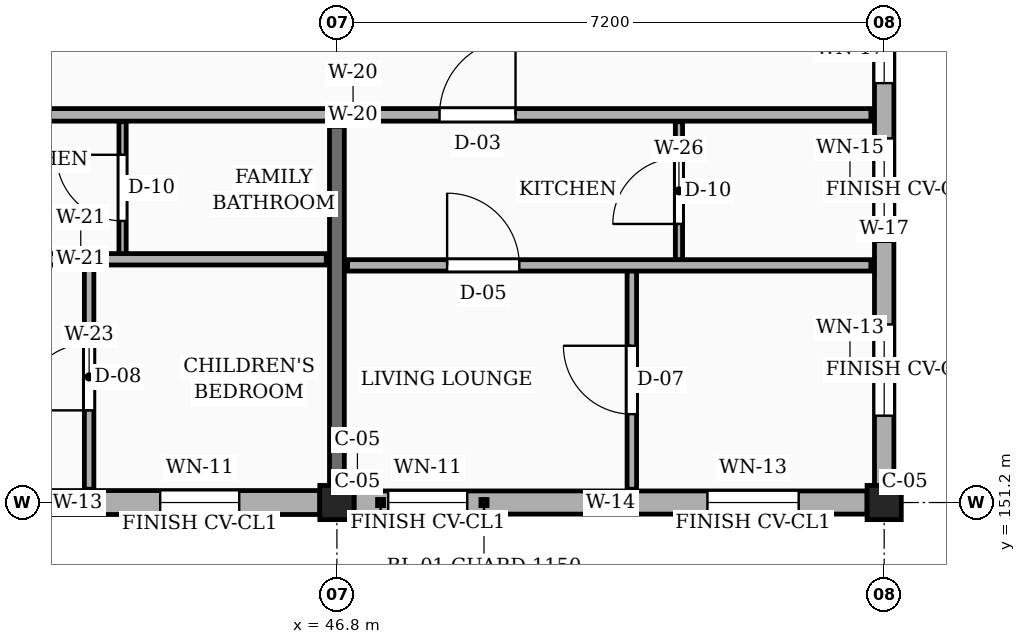
"""IFC4 building model, lengths in metres.
Left out: names, types, materials, properties, quantities, classifications, styles, units other than length and angle.
Written with IfcOpenShell. Run it as: python <this file> out.ifc"""

import sys

from ifc_helpers import new_model, si_unit, direction, frame, frame_2d, origin, origin_2d, place, context, subcontext, project, spatial, rectangle, extrude, element, fill, save


model = new_model("IFC4")
c1 = context("Model", 3, precision=1e-05, world=origin(), true_north=direction((0.0, 1.0)))
c2 = subcontext(c1, "Body", "Model", "MODEL_VIEW")
j1 = project(units=[si_unit("LENGTHUNIT", "METRE"), si_unit("PLANEANGLEUNIT", "RADIAN")], contexts=[c1])
p1 = place(None, origin())
s1 = spatial("IfcSite", under=j1, at=p1, CompositionType="ELEMENT")
p2 = place(p1, origin())
s2 = spatial("IfcBuilding", under=s1, at=p2, CompositionType="ELEMENT")
p3 = place(p2, frame((0.0, 0.0, 39.15)))
s3 = spatial("IfcBuildingStorey", under=s2, at=p3, CompositionType="ELEMENT", Elevation=39.15)
for number, where, z_axis, x_axis in (
    (1, (46.8, 151.2, 0.0), (0.0, 0.0, 1.0), (1.0, 0.0, 0.0)),
    (2, (54.0, 151.2, 0.0), (0.0, 0.0, 1.0), (1.0, 0.0, 0.0)),
):
    element("IfcColumn", number, at=place(p3, frame(where, z_axis=z_axis, x_axis=x_axis)), inside=s3, PredefinedType="COLUMN", context=c2, shape_type="SweptSolid", body=[
        extrude(rectangle(XDim=0.45, YDim=0.45, at=origin_2d()), origin(), (0.0, 0.0, 1.0), 3.15),
    ])
p4 = place(p3, frame((46.8, 151.425, 0.0), z_axis=(0.0, 0.0, 1.0), x_axis=(0.0, 1.0, 0.0)))
e3 = element("IfcWall", 3, at=p4, inside=s3, PredefinedType="SOLIDWALL", context=c2, shape_type="SweptSolid", body=[
    extrude(rectangle(XDim=4.725, YDim=0.195, at=frame_2d((2.362, 0.0))), origin(), (0.0, 0.0, 1.0), 2.185),
])
p5 = place(p3, frame((39.825, 151.2, 0.0), z_axis=(0.0, 0.0, 1.0), x_axis=(1.0, 0.0, 0.0)))
e4 = element("IfcWall", 4, at=p5, inside=s3, PredefinedType="SOLIDWALL", context=c2, shape_type="SweptSolid", body=[
    extrude(rectangle(XDim=6.75, YDim=0.315, at=frame_2d((3.375, 0.0))), origin(), (0.0, 0.0, 1.0), 2.455),
])
p6 = place(p5, frame((0.45, 0.0, 0.78)))
e5 = element("IfcOpeningElement", 5, at=p6, cuts=e4, PredefinedType="OPENING", context=c2, shape_type="SweptSolid", body=[
    extrude(rectangle(XDim=0.88, YDim=1.26, at=frame_2d((0.44, 0.63))), frame((0.0, 0.167, 0.0), z_axis=(0.0, -1.0, 0.0), x_axis=(1.0, 0.0, 0.0)), (0.0, 0.0, 1.0), 0.335),
])
p7 = place(p5, frame((4.65, 0.0, 0.78)))
e6 = element("IfcOpeningElement", 6, at=p7, cuts=e4, PredefinedType="OPENING", context=c2, shape_type="SweptSolid", body=[
    extrude(rectangle(XDim=1.04, YDim=1.26, at=frame_2d((0.52, 0.63))), frame((0.0, 0.167, 0.0), z_axis=(0.0, -1.0, 0.0), x_axis=(1.0, 0.0, 0.0)), (0.0, 0.0, 1.0), 0.335),
])
p8 = place(p3, frame((47.025, 151.2, 0.0), z_axis=(0.0, 0.0, 1.0), x_axis=(1.0, 0.0, 0.0)))
e7 = element("IfcWall", 7, at=p8, inside=s3, PredefinedType="SOLIDWALL", context=c2, shape_type="SweptSolid", body=[
    extrude(rectangle(XDim=6.75, YDim=0.305, at=frame_2d((3.375, 0.0))), origin(), (0.0, 0.0, 1.0), 2.455),
])
p9 = place(p8, frame((0.45, 0.0, 0.78)))
e8 = element("IfcOpeningElement", 8, at=p9, cuts=e7, PredefinedType="OPENING", context=c2, shape_type="SweptSolid", body=[
    extrude(rectangle(XDim=1.04, YDim=1.26, at=frame_2d((0.52, 0.63))), frame((0.0, 0.163, 0.0), z_axis=(0.0, -1.0, 0.0), x_axis=(1.0, 0.0, 0.0)), (0.0, 0.0, 1.0), 0.325),
])
p10 = place(p8, frame((4.65, 0.0, 0.78)))
e9 = element("IfcOpeningElement", 9, at=p10, cuts=e7, PredefinedType="OPENING", context=c2, shape_type="SweptSolid", body=[
    extrude(rectangle(XDim=1.2, YDim=1.26, at=frame_2d((0.6, 0.63))), frame((0.0, 0.163, 0.0), z_axis=(0.0, -1.0, 0.0), x_axis=(1.0, 0.0, 0.0)), (0.0, 0.0, 1.0), 0.325),
])
p11 = place(p3, frame((54.0, 151.425, 0.0), z_axis=(0.0, 0.0, 1.0), x_axis=(0.0, 1.0, 0.0)))
e10 = element("IfcWall", 10, at=p11, inside=s3, PredefinedType="SOLIDWALL", context=c2, shape_type="SweptSolid", body=[
    extrude(rectangle(XDim=6.75, YDim=0.255, at=frame_2d((3.375, 0.0))), origin(), (0.0, 0.0, 1.0), 2.455),
])
p12 = place(p11, frame((0.917, 0.0, 0.78)))
e11 = element("IfcOpeningElement", 11, at=p12, cuts=e10, PredefinedType="OPENING", context=c2, shape_type="SweptSolid", body=[
    extrude(rectangle(XDim=1.2, YDim=1.26, at=frame_2d((0.6, 0.63))), frame((0.0, 0.137, 0.0), z_axis=(0.0, -1.0, 0.0), x_axis=(1.0, 0.0, 0.0)), (0.0, 0.0, 1.0), 0.275),
])
p13 = place(p11, frame((3.205, 0.0, 0.78)))
e12 = element("IfcOpeningElement", 12, at=p13, cuts=e10, PredefinedType="OPENING", context=c2, shape_type="SweptSolid", body=[
    extrude(rectangle(XDim=1.36, YDim=1.26, at=frame_2d((0.68, 0.63))), frame((0.0, 0.137, 0.0), z_axis=(0.0, -1.0, 0.0), x_axis=(1.0, 0.0, 0.0)), (0.0, 0.0, 1.0), 0.275),
])
p14 = place(p11, frame((5.292, 0.0, 0.78)))
e13 = element("IfcOpeningElement", 13, at=p14, cuts=e10, PredefinedType="OPENING", context=c2, shape_type="SweptSolid", body=[
    extrude(rectangle(XDim=0.9, YDim=1.36, at=frame_2d((0.45, 0.68))), frame((0.0, 0.137, 0.0), z_axis=(0.0, -1.0, 0.0), x_axis=(1.0, 0.0, 0.0)), (0.0, 0.0, 1.0), 0.275),
])
p15 = place(p3, frame((39.62, 156.3, 0.0), z_axis=(0.0, 0.0, 1.0), x_axis=(1.0, 0.0, 0.0)))
e14 = element("IfcWall", 14, at=p15, inside=s3, PredefinedType="PARTITIONING", context=c2, shape_type="SweptSolid", body=[
    extrude(rectangle(XDim=7.16, YDim=0.165, at=frame_2d((3.58, 0.0))), origin(), (0.0, 0.0, 1.0), 2.32),
])
p16 = place(p15, frame((1.33, 0.0, 0.0)))
e15 = element("IfcOpeningElement", 15, at=p16, cuts=e14, PredefinedType="OPENING", context=c2, shape_type="SweptSolid", body=[
    extrude(rectangle(XDim=1.14, YDim=2.18, at=frame_2d((0.57, 1.09))), frame((0.0, 0.093, 0.0), z_axis=(0.0, -1.0, 0.0), x_axis=(1.0, 0.0, 0.0)), (0.0, 0.0, 1.0), 0.185),
])
p17 = place(p3, frame((46.82, 156.3, 0.0), z_axis=(0.0, 0.0, 1.0), x_axis=(1.0, 0.0, 0.0)))
e16 = element("IfcWall", 16, at=p17, inside=s3, PredefinedType="PARTITIONING", context=c2, shape_type="SweptSolid", body=[
    extrude(rectangle(XDim=7.005, YDim=0.165, at=frame_2d((3.502, 0.0))), origin(), (0.0, 0.0, 1.0), 2.32),
])
p18 = place(p17, frame((1.33, 0.0, 0.0)))
e17 = element("IfcOpeningElement", 17, at=p18, cuts=e16, PredefinedType="OPENING", context=c2, shape_type="SweptSolid", body=[
    extrude(rectangle(XDim=1.0, YDim=2.15, at=frame_2d((0.5, 1.075))), frame((0.0, 0.093, 0.0), z_axis=(0.0, -1.0, 0.0), x_axis=(1.0, 0.0, 0.0)), (0.0, 0.0, 1.0), 0.185),
])
p19 = place(p3, frame((43.54, 151.375, 0.0), z_axis=(0.0, 0.0, 1.0), x_axis=(0.0, 1.0, 0.0)))
e18 = element("IfcWall", 18, at=p19, inside=s3, PredefinedType="PARTITIONING", context=c2, shape_type="SweptSolid", body=[
    extrude(rectangle(XDim=2.955, YDim=0.125, at=frame_2d((1.478, 0.0))), origin(), (0.0, 0.0, 1.0), 2.32),
])
p20 = place(p19, frame((1.038, 0.0, 0.0)))
e19 = element("IfcOpeningElement", 19, at=p20, cuts=e18, PredefinedType="OPENING", context=c2, shape_type="SweptSolid", body=[
    extrude(rectangle(XDim=0.88, YDim=2.08, at=frame_2d((0.44, 1.04))), frame((0.0, 0.073, 0.0), z_axis=(0.0, -1.0, 0.0), x_axis=(1.0, 0.0, 0.0)), (0.0, 0.0, 1.0), 0.145),
])
p21 = place(p3, frame((43.98, 154.47, 0.0), z_axis=(0.0, 0.0, 1.0), x_axis=(0.0, 1.0, 0.0)))
e20 = element("IfcWall", 20, at=p21, inside=s3, PredefinedType="PARTITIONING", context=c2, shape_type="SweptSolid", body=[
    extrude(rectangle(XDim=1.74, YDim=0.095, at=frame_2d((0.87, 0.0))), origin(), (0.0, 0.0, 1.0), 2.32),
])
p22 = place(p21, frame((0.435, 0.0, 0.0)))
e21 = element("IfcOpeningElement", 21, at=p22, cuts=e20, PredefinedType="OPENING", context=c2, shape_type="SweptSolid", body=[
    extrude(rectangle(XDim=0.87, YDim=2.05, at=frame_2d((0.435, 1.025))), frame((0.0, 0.058, 0.0), z_axis=(0.0, -1.0, 0.0), x_axis=(1.0, 0.0, 0.0)), (0.0, 0.0, 1.0), 0.115),
])
p23 = place(p3, frame((39.74, 154.4, 0.0), z_axis=(0.0, 0.0, 1.0), x_axis=(1.0, 0.0, 0.0)))
e22 = element("IfcWall", 22, at=p23, inside=s3, PredefinedType="PARTITIONING", context=c2, shape_type="SweptSolid", body=[
    extrude(rectangle(XDim=6.92, YDim=0.15, at=frame_2d((3.46, 0.0))), origin(), (0.0, 0.0, 1.0), 2.32),
])
p24 = place(p23, frame((1.31, 0.0, 0.0)))
e23 = element("IfcOpeningElement", 23, at=p24, cuts=e22, PredefinedType="OPENING", context=c2, shape_type="SweptSolid", body=[
    extrude(rectangle(XDim=0.92, YDim=2.1, at=frame_2d((0.46, 1.05))), frame((0.0, 0.085, 0.0), z_axis=(0.0, -1.0, 0.0), x_axis=(1.0, 0.0, 0.0)), (0.0, 0.0, 1.0), 0.17),
])
p25 = place(p3, frame((50.68, 151.375, 0.0), z_axis=(0.0, 0.0, 1.0), x_axis=(0.0, 1.0, 0.0)))
e24 = element("IfcWall", 24, at=p25, inside=s3, PredefinedType="PARTITIONING", context=c2, shape_type="SweptSolid", body=[
    extrude(rectangle(XDim=2.875, YDim=0.125, at=frame_2d((1.438, 0.0))), origin(), (0.0, 0.0, 1.0), 2.32),
])
p26 = place(p25, frame((0.988, 0.0, 0.0)))
e25 = element("IfcOpeningElement", 25, at=p26, cuts=e24, PredefinedType="OPENING", context=c2, shape_type="SweptSolid", body=[
    extrude(rectangle(XDim=0.9, YDim=2.1, at=frame_2d((0.45, 1.05))), frame((0.0, 0.073, 0.0), z_axis=(0.0, -1.0, 0.0), x_axis=(1.0, 0.0, 0.0)), (0.0, 0.0, 1.0), 0.145),
])
p27 = place(p3, frame((51.3, 154.39, 0.0), z_axis=(0.0, 0.0, 1.0), x_axis=(0.0, 1.0, 0.0)))
e26 = element("IfcWall", 26, at=p27, inside=s3, PredefinedType="PARTITIONING", context=c2, shape_type="SweptSolid", body=[
    extrude(rectangle(XDim=1.82, YDim=0.095, at=frame_2d((0.91, 0.0))), origin(), (0.0, 0.0, 1.0), 2.32),
])
p28 = place(p27, frame((0.475, 0.0, 0.0)))
e27 = element("IfcOpeningElement", 27, at=p28, cuts=e26, PredefinedType="OPENING", context=c2, shape_type="SweptSolid", body=[
    extrude(rectangle(XDim=0.87, YDim=2.05, at=frame_2d((0.435, 1.025))), frame((0.0, 0.058, 0.0), z_axis=(0.0, -1.0, 0.0), x_axis=(1.0, 0.0, 0.0)), (0.0, 0.0, 1.0), 0.115),
])
p29 = place(p3, frame((46.94, 154.32, 0.0), z_axis=(0.0, 0.0, 1.0), x_axis=(1.0, 0.0, 0.0)))
e28 = element("IfcWall", 28, at=p29, inside=s3, PredefinedType="PARTITIONING", context=c2, shape_type="SweptSolid", body=[
    extrude(rectangle(XDim=6.885, YDim=0.15, at=frame_2d((3.442, 0.0))), origin(), (0.0, 0.0, 1.0), 2.32),
])
p30 = place(p29, frame((1.31, 0.0, 0.0)))
e29 = element("IfcOpeningElement", 29, at=p30, cuts=e28, PredefinedType="OPENING", context=c2, shape_type="SweptSolid", body=[
    extrude(rectangle(XDim=0.95, YDim=2.1, at=frame_2d((0.475, 1.05))), frame((0.0, 0.085, 0.0), z_axis=(0.0, -1.0, 0.0), x_axis=(1.0, 0.0, 0.0)), (0.0, 0.0, 1.0), 0.17),
])
p31 = place(p7, origin())
e30 = element("IfcWindow", 30, at=p31, inside=s3, PartitioningType="SINGLE_PANEL", PredefinedType="WINDOW", context=c2, shape_type="SweptSolid", body=[
    extrude(rectangle(XDim=1.04, YDim=1.26, at=frame_2d((0.52, 0.63))), frame((0.0, 0.03, 0.0), z_axis=(0.0, -1.0, 0.0), x_axis=(1.0, 0.0, 0.0)), (0.0, 0.0, 1.0), 0.06),
])
fill(e6, e30)
p32 = place(p9, origin())
e31 = element("IfcWindow", 31, at=p32, inside=s3, PartitioningType="SINGLE_PANEL", PredefinedType="WINDOW", context=c2, shape_type="SweptSolid", body=[
    extrude(rectangle(XDim=1.04, YDim=1.26, at=frame_2d((0.52, 0.63))), frame((0.0, 0.03, 0.0), z_axis=(0.0, -1.0, 0.0), x_axis=(1.0, 0.0, 0.0)), (0.0, 0.0, 1.0), 0.06),
])
fill(e8, e31)
p33 = place(p10, origin())
e32 = element("IfcWindow", 32, at=p33, inside=s3, PartitioningType="SINGLE_PANEL", PredefinedType="WINDOW", context=c2, shape_type="SweptSolid", body=[
    extrude(rectangle(XDim=1.2, YDim=1.26, at=frame_2d((0.6, 0.63))), frame((0.0, 0.03, 0.0), z_axis=(0.0, -1.0, 0.0), x_axis=(1.0, 0.0, 0.0)), (0.0, 0.0, 1.0), 0.06),
])
fill(e9, e32)
p34 = place(p12, origin())
e33 = element("IfcWindow", 33, at=p34, inside=s3, PartitioningType="SINGLE_PANEL", PredefinedType="WINDOW", context=c2, shape_type="SweptSolid", body=[
    extrude(rectangle(XDim=1.2, YDim=1.26, at=frame_2d((0.6, 0.63))), frame((0.0, 0.03, 0.0), z_axis=(0.0, -1.0, 0.0), x_axis=(1.0, 0.0, 0.0)), (0.0, 0.0, 1.0), 0.06),
])
fill(e11, e33)
p35 = place(p13, origin())
e34 = element("IfcWindow", 34, at=p35, inside=s3, PartitioningType="SINGLE_PANEL", PredefinedType="WINDOW", context=c2, shape_type="SweptSolid", body=[
    extrude(rectangle(XDim=1.36, YDim=1.26, at=frame_2d((0.68, 0.63))), frame((0.0, 0.03, 0.0), z_axis=(0.0, -1.0, 0.0), x_axis=(1.0, 0.0, 0.0)), (0.0, 0.0, 1.0), 0.06),
])
fill(e12, e34)
p36 = place(p14, origin())
e35 = element("IfcWindow", 35, at=p36, inside=s3, PartitioningType="SINGLE_PANEL", PredefinedType="WINDOW", context=c2, shape_type="SweptSolid", body=[
    extrude(rectangle(XDim=0.9, YDim=1.36, at=frame_2d((0.45, 0.68))), frame((0.0, 0.03, 0.0), z_axis=(0.0, -1.0, 0.0), x_axis=(1.0, 0.0, 0.0)), (0.0, 0.0, 1.0), 0.06),
])
fill(e13, e35)
p37 = place(p18, origin())
e36 = element("IfcDoor", 36, at=p37, inside=s3, OperationType="SINGLE_SWING_RIGHT", PredefinedType="DOOR", context=c2, shape_type="SweptSolid", body=[
    extrude(rectangle(XDim=1.0, YDim=2.15, at=frame_2d((0.5, 1.075))), frame((0.0, 0.025, 0.0), z_axis=(0.0, -1.0, 0.0), x_axis=(1.0, 0.0, 0.0)), (0.0, 0.0, 1.0), 0.05),
])
fill(e17, e36)
p38 = place(p20, origin())
e37 = element("IfcDoor", 37, at=p38, inside=s3, OperationType="SINGLE_SWING_LEFT", PredefinedType="DOOR", context=c2, shape_type="SweptSolid", body=[
    extrude(rectangle(XDim=0.88, YDim=2.08, at=frame_2d((0.44, 1.04))), frame((0.0, 0.025, 0.0), z_axis=(0.0, -1.0, 0.0), x_axis=(1.0, 0.0, 0.0)), (0.0, 0.0, 1.0), 0.05),
])
fill(e19, e37)
p39 = place(p22, origin())
e38 = element("IfcDoor", 38, at=p39, inside=s3, OperationType="SINGLE_SWING_RIGHT", PredefinedType="DOOR", context=c2, shape_type="SweptSolid", body=[
    extrude(rectangle(XDim=0.87, YDim=2.05, at=frame_2d((0.435, 1.025))), frame((0.0, 0.025, 0.0), z_axis=(0.0, -1.0, 0.0), x_axis=(1.0, 0.0, 0.0)), (0.0, 0.0, 1.0), 0.05),
])
fill(e21, e38)
p40 = place(p26, origin())
e39 = element("IfcDoor", 39, at=p40, inside=s3, OperationType="SINGLE_SWING_RIGHT", PredefinedType="DOOR", context=c2, shape_type="SweptSolid", body=[
    extrude(rectangle(XDim=0.9, YDim=2.1, at=frame_2d((0.45, 1.05))), frame((0.0, 0.025, 0.0), z_axis=(0.0, -1.0, 0.0), x_axis=(1.0, 0.0, 0.0)), (0.0, 0.0, 1.0), 0.05),
])
fill(e25, e39)
p41 = place(p28, origin())
e40 = element("IfcDoor", 40, at=p41, inside=s3, OperationType="SINGLE_SWING_LEFT", PredefinedType="DOOR", context=c2, shape_type="SweptSolid", body=[
    extrude(rectangle(XDim=0.87, YDim=2.05, at=frame_2d((0.435, 1.025))), frame((0.0, 0.025, 0.0), z_axis=(0.0, -1.0, 0.0), x_axis=(1.0, 0.0, 0.0)), (0.0, 0.0, 1.0), 0.05),
])
fill(e27, e40)
p42 = place(p30, origin())
e41 = element("IfcDoor", 41, at=p42, inside=s3, OperationType="SINGLE_SWING_LEFT", PredefinedType="DOOR", context=c2, shape_type="SweptSolid", body=[
    extrude(rectangle(XDim=0.95, YDim=2.1, at=frame_2d((0.475, 1.05))), frame((0.0, 0.025, 0.0), z_axis=(0.0, -1.0, 0.0), x_axis=(1.0, 0.0, 0.0)), (0.0, 0.0, 1.0), 0.05),
])
fill(e29, e41)
save(model, sys.argv[1])
